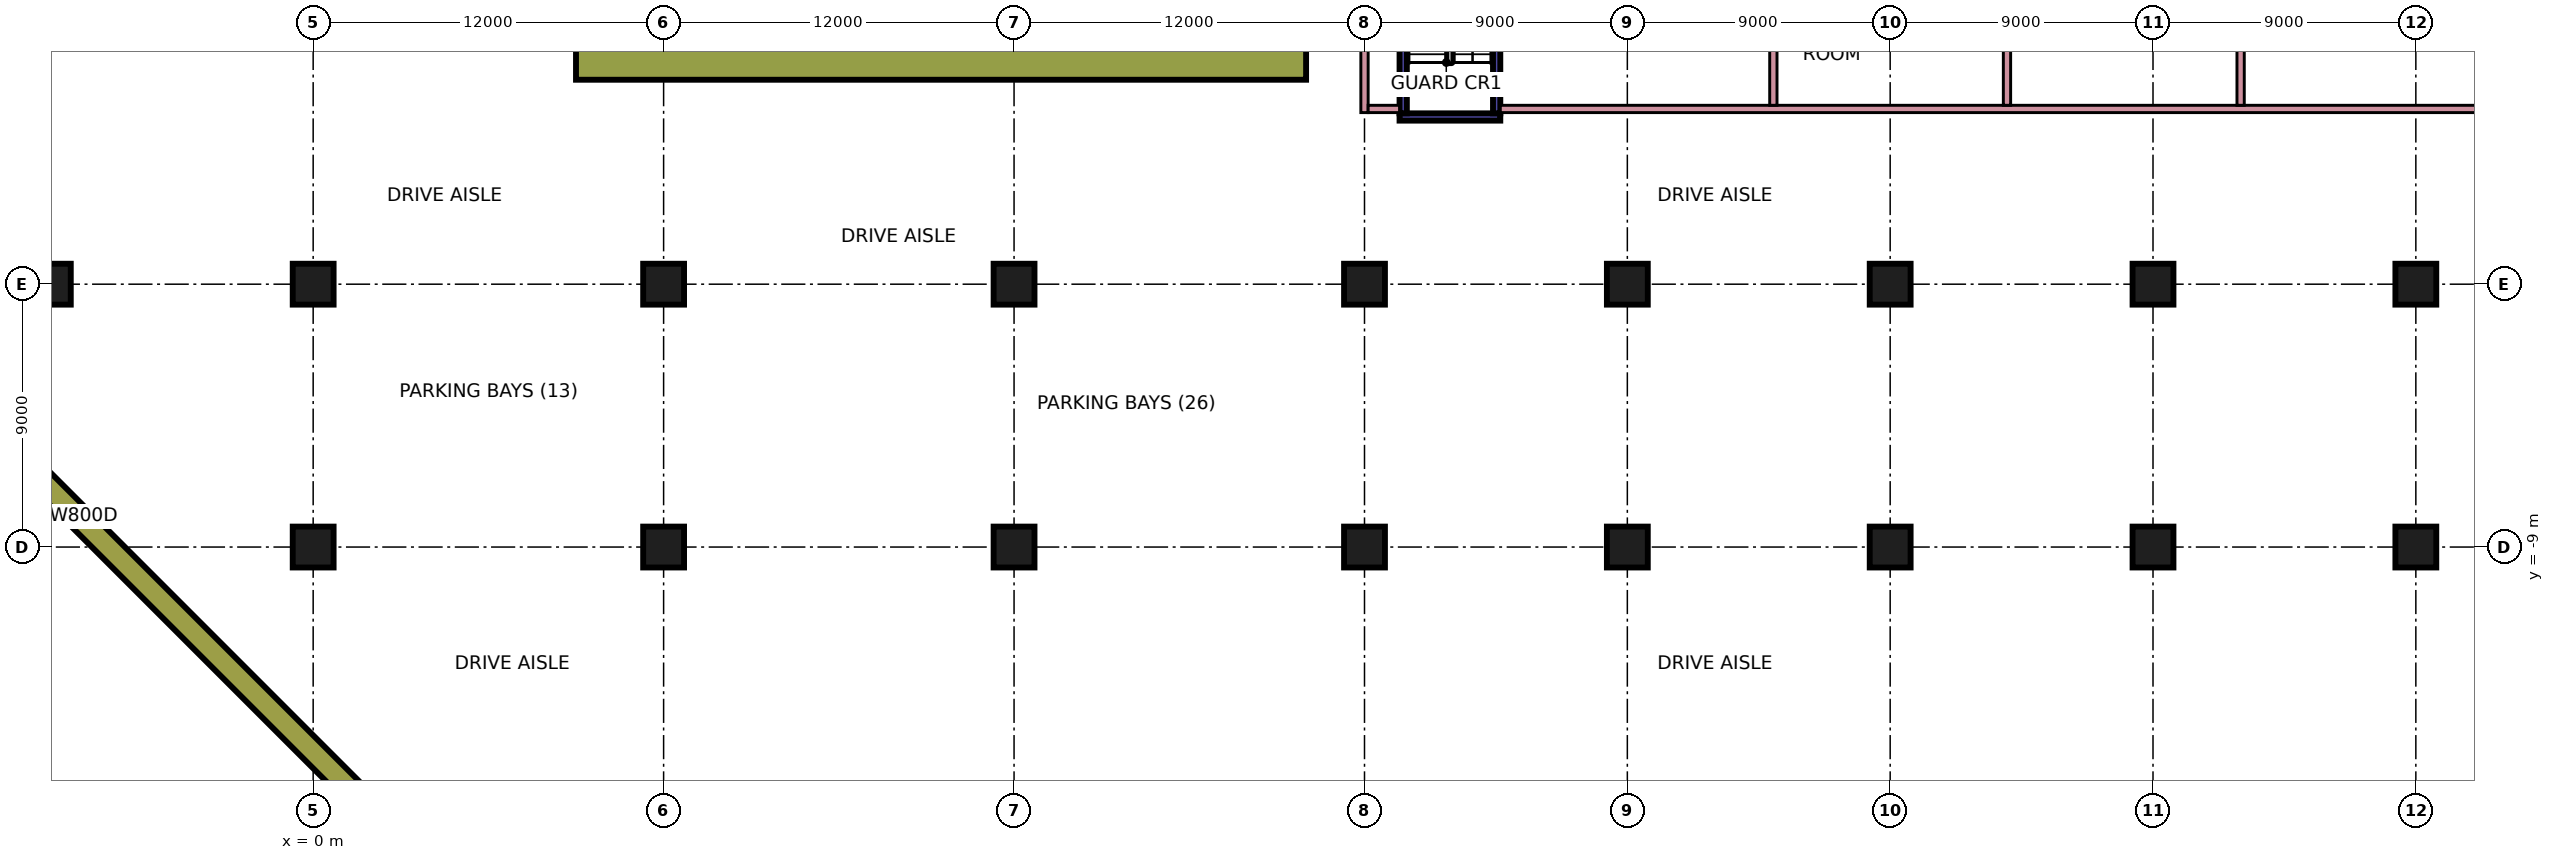
"""IFC4 building model, lengths in metres.
Left out: names, types, materials, properties, quantities, classifications, styles, units other than length and angle.
Written with IfcOpenShell. Run it as: python <this file> out.ifc"""

import sys

from ifc_helpers import new_model, si_unit, direction, frame, frame_2d, origin, origin_2d, place, context, subcontext, project, spatial, rectangle, extrude, element, save


model = new_model("IFC4")
c1 = context("Model", 3, precision=1e-05, world=origin(), true_north=direction((0.0, 1.0)))
c2 = subcontext(c1, "Body", "Model", "MODEL_VIEW")
j1 = project(units=[si_unit("LENGTHUNIT", "METRE"), si_unit("PLANEANGLEUNIT", "RADIAN")], contexts=[c1])
p1 = place(None, origin())
s1 = spatial("IfcSite", under=j1, at=p1, CompositionType="ELEMENT")
p2 = place(p1, origin())
s2 = spatial("IfcBuilding", under=s1, at=p2, CompositionType="ELEMENT")
p3 = place(p2, frame((0.0, 0.0, -9.0)))
s3 = spatial("IfcBuildingStorey", under=s2, at=p3, CompositionType="ELEMENT", Elevation=-9.0)
for number, where, z_axis, x_axis in (
    (1, (-9.0, 0.0, 0.0), (0.0, 0.0, 1.0), (1.0, 0.0, 0.0)),
    (2, (0.0, -9.0, 0.0), (0.0, 0.0, 1.0), (1.0, 0.0, 0.0)),
    (3, (0.0, 0.0, 0.0), (0.0, 0.0, 1.0), (1.0, 0.0, 0.0)),
    (4, (12.0, -9.0, 0.0), (0.0, 0.0, 1.0), (1.0, 0.0, 0.0)),
    (5, (12.0, 0.0, 0.0), (0.0, 0.0, 1.0), (1.0, 0.0, 0.0)),
    (6, (24.0, -9.0, 0.0), (0.0, 0.0, 1.0), (1.0, 0.0, 0.0)),
    (7, (24.0, 0.0, 0.0), (0.0, 0.0, 1.0), (1.0, 0.0, 0.0)),
    (8, (36.0, -9.0, 0.0), (0.0, 0.0, 1.0), (1.0, 0.0, 0.0)),
    (9, (36.0, 0.0, 0.0), (0.0, 0.0, 1.0), (1.0, 0.0, 0.0)),
    (10, (45.0, -9.0, 0.0), (0.0, 0.0, 1.0), (1.0, 0.0, 0.0)),
    (11, (45.0, 0.0, 0.0), (0.0, 0.0, 1.0), (1.0, 0.0, 0.0)),
    (12, (54.0, -9.0, 0.0), (0.0, 0.0, 1.0), (1.0, 0.0, 0.0)),
    (13, (54.0, 0.0, 0.0), (0.0, 0.0, 1.0), (1.0, 0.0, 0.0)),
    (14, (63.0, -9.0, 0.0), (0.0, 0.0, 1.0), (1.0, 0.0, 0.0)),
    (15, (63.0, 0.0, 0.0), (0.0, 0.0, 1.0), (1.0, 0.0, 0.0)),
    (16, (72.0, -9.0, 0.0), (0.0, 0.0, 1.0), (1.0, 0.0, 0.0)),
    (17, (72.0, 0.0, 0.0), (0.0, 0.0, 1.0), (1.0, 0.0, 0.0)),
):
    element("IfcColumn", number, at=place(p3, frame(where, z_axis=z_axis, x_axis=x_axis)), inside=s3, PredefinedType="COLUMN", context=c2, shape_type="SweptSolid", body=[
        extrude(rectangle(XDim=1.4, YDim=1.4, at=origin_2d()), origin(), (0.0, 0.0, 1.0), 4.5),
    ])
p4 = place(p3, frame((9.0, 7.6, 0.0), z_axis=(0.0, 0.0, 1.0), x_axis=(1.0, 0.0, 0.0)))
e18 = element("IfcWall", 18, at=p4, inside=s3, PredefinedType="SHEAR", context=c2, shape_type="SweptSolid", body=[
    extrude(rectangle(XDim=25.0, YDim=1.2, at=frame_2d((12.5, 0.0))), origin(), (0.0, 0.0, 1.0), 4.5),
])
p5 = place(p3, frame((37.2, 5.725, 0.0), z_axis=(0.0, 0.0, 1.0), x_axis=(1.0, 0.0, 0.0)))
e19 = element("IfcWall", 19, at=p5, inside=s3, PredefinedType="SHEAR", context=c2, shape_type="SweptSolid", body=[
    extrude(rectangle(XDim=3.45, YDim=0.25, at=frame_2d((1.725, 0.0))), origin(), (0.0, 0.0, 1.0), 4.5),
])
for number, where, z_axis, x_axis in (
    (20, (37.325, 5.85, 0.0), (0.0, 0.0, 1.0), (0.0, 1.0, 0.0)),
    (21, (40.525, 5.85, 0.0), (0.0, 0.0, 1.0), (0.0, 1.0, 0.0)),
):
    element("IfcWall", number, at=place(p3, frame(where, z_axis=z_axis, x_axis=x_axis)), inside=s3, PredefinedType="SHEAR", context=c2, shape_type="SweptSolid", body=[
        extrude(rectangle(XDim=6.5, YDim=0.25, at=frame_2d((3.25, 0.0))), origin(), (0.0, 0.0, 1.0), 4.5),
    ])
p6 = place(p3, frame((-20.717, 4.706, 0.0), z_axis=(0.0, 0.0, 1.0), x_axis=(0.707103370229, -0.707110192127, 0.0)))
e22 = element("IfcWall", 22, at=p6, inside=s3, PredefinedType="SOLIDWALL", context=c2, shape_type="SweptSolid", body=[
    extrude(rectangle(XDim=35.788, YDim=0.8, at=frame_2d((17.894, 0.0))), origin(), (0.0, 0.0, 1.0), 4.5),
])
p7 = place(p3, frame((36.0, 5.875, 0.0), z_axis=(0.0, 0.0, 1.0), x_axis=(0.0, 1.0, 0.0)))
e23 = element("IfcWall", 23, at=p7, inside=s3, PredefinedType="PARTITIONING", context=c2, shape_type="SweptSolid", body=[
    extrude(rectangle(XDim=5.426, YDim=0.25, at=frame_2d((2.713, 0.0))), origin(), (0.0, 0.0, 1.0), 4.05),
])
p8 = place(p3, frame((36.125, 6.0, 0.0), z_axis=(0.0, 0.0, 1.0), x_axis=(1.0, 0.0, 0.0)))
e24 = element("IfcWall", 24, at=p8, inside=s3, PredefinedType="PARTITIONING", context=c2, shape_type="SweptSolid", body=[
    extrude(rectangle(XDim=1.075, YDim=0.25, at=frame_2d((0.538, 0.0))), origin(), (0.0, 0.0, 1.0), 4.05),
])
p9 = place(p3, frame((40.65, 6.0, 0.0), z_axis=(0.0, 0.0, 1.0), x_axis=(1.0, 0.0, 0.0)))
e25 = element("IfcWall", 25, at=p9, inside=s3, PredefinedType="PARTITIONING", context=c2, shape_type="SweptSolid", body=[
    extrude(rectangle(XDim=35.475, YDim=0.25, at=frame_2d((17.738, 0.0))), origin(), (0.0, 0.0, 1.0), 4.05),
])
p10 = place(p3, frame((50.0, 6.125, 0.0), z_axis=(0.0, 0.0, 1.0), x_axis=(0.0, 1.0, 0.0)))
e26 = element("IfcWall", 26, at=p10, inside=s3, PredefinedType="PARTITIONING", context=c2, shape_type="SweptSolid", body=[
    extrude(rectangle(XDim=9.475, YDim=0.25, at=frame_2d((4.738, 0.0))), origin(), (0.0, 0.0, 1.0), 4.05),
])
for number, where, z_axis, x_axis in (
    (27, (58.0, 6.125, 0.0), (0.0, 0.0, 1.0), (0.0, 1.0, 0.0)),
    (28, (66.0, 6.125, 0.0), (0.0, 0.0, 1.0), (0.0, 1.0, 0.0)),
):
    element("IfcWall", number, at=place(p3, frame(where, z_axis=z_axis, x_axis=x_axis)), inside=s3, PredefinedType="PARTITIONING", context=c2, shape_type="SweptSolid", body=[
        extrude(rectangle(XDim=12.55, YDim=0.25, at=frame_2d((6.275, 0.0))), origin(), (0.0, 0.0, 1.0), 4.05),
    ])
save(model, sys.argv[1])
